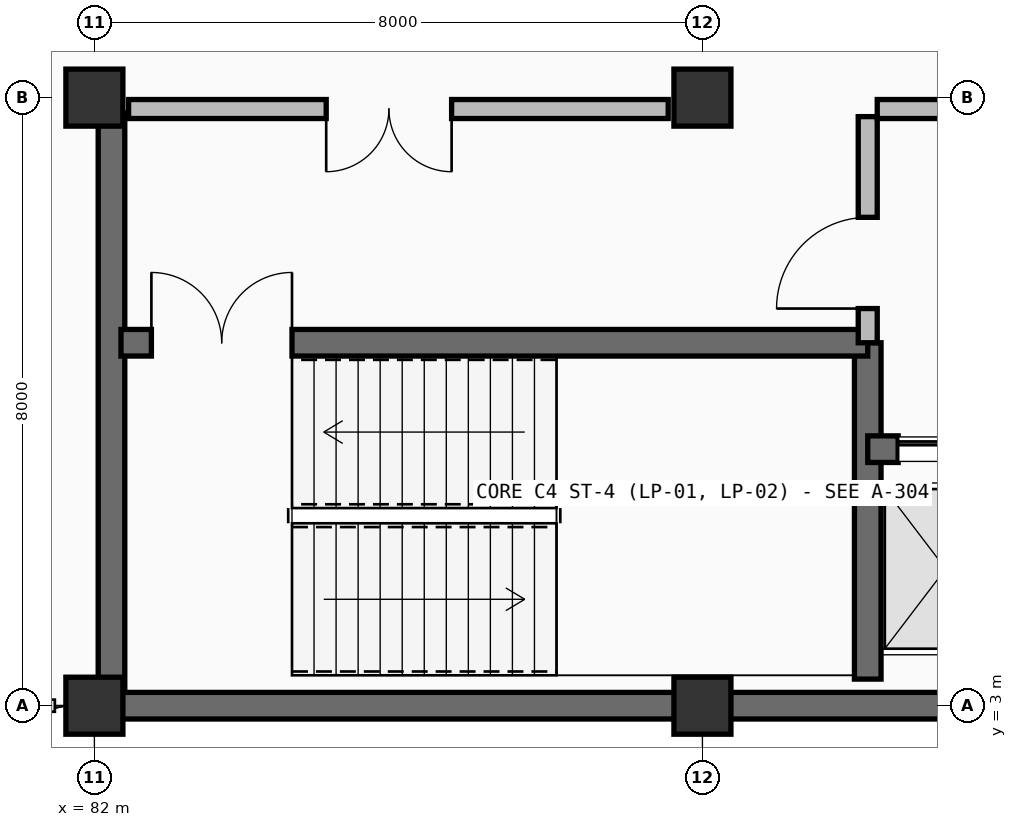
"""IFC4 building model, lengths in metres.
Left out: names, types, materials, properties, quantities, classifications, styles, units other than length and angle.
Written with IfcOpenShell. Run it as: python <this file> out.ifc"""

import sys

from ifc_helpers import new_model, si_unit, direction, frame, frame_2d, origin, origin_2d, place, context, subcontext, project, spatial, rectangle, extrude, element, fill, save


model = new_model("IFC4")
c1 = context("Model", 3, precision=1e-05, world=origin(), true_north=direction((0.0, 1.0)))
c2 = subcontext(c1, "Body", "Model", "MODEL_VIEW")
j1 = project(units=[si_unit("LENGTHUNIT", "METRE"), si_unit("PLANEANGLEUNIT", "RADIAN")], contexts=[c1])
p1 = place(None, origin())
s1 = spatial("IfcSite", under=j1, at=p1, CompositionType="ELEMENT")
p2 = place(p1, origin())
s2 = spatial("IfcBuilding", under=s1, at=p2, CompositionType="ELEMENT")
p3 = place(p2, frame((0.0, 0.0, 5.4)))
s3 = spatial("IfcBuildingStorey", under=s2, at=p3, CompositionType="ELEMENT", Elevation=5.4)
for number, where, z_axis, x_axis in (
    (1, (82.0, 3.0, 0.0), (0.0, 0.0, 1.0), (1.0, 0.0, 0.0)),
    (2, (82.0, 11.0, 0.0), (0.0, 0.0, 1.0), (1.0, 0.0, 0.0)),
    (3, (90.0, 3.0, 0.0), (0.0, 0.0, 1.0), (1.0, 0.0, 0.0)),
    (4, (90.0, 11.0, 0.0), (0.0, 0.0, 1.0), (1.0, 0.0, 0.0)),
):
    element("IfcColumn", number, at=place(p3, frame(where, z_axis=z_axis, x_axis=x_axis)), inside=s3, PredefinedType="COLUMN", context=c2, shape_type="SweptSolid", body=[
        extrude(rectangle(XDim=0.75, YDim=0.75, at=origin_2d()), origin(), (0.0, 0.0, 1.0), 4.5),
    ])
for number, where, z_axis, x_axis in (
    (5, (98.0, 3.0, 0.0), (0.0, 0.0, 1.0), (-1.0, 0.0, 0.0)),
    (6, (90.0, 3.0, 0.0), (0.0, 0.0, 1.0), (-1.0, 0.0, 0.0)),
):
    element("IfcWall", number, at=place(p3, frame(where, z_axis=z_axis, x_axis=x_axis)), inside=s3, PredefinedType="SHEAR", context=c2, shape_type="SweptSolid", body=[
        extrude(rectangle(XDim=8.0, YDim=0.35, at=frame_2d((4.0, 0.0))), origin(), (0.0, 0.0, 1.0), 4.5),
    ])
p4 = place(p3, frame((82.225, 3.2, 0.0), z_axis=(0.0, 0.0, 1.0), x_axis=(0.0, 1.0, 0.0)))
e7 = element("IfcWall", 7, at=p4, inside=s3, PredefinedType="SHEAR", context=c2, shape_type="SweptSolid", body=[
    extrude(rectangle(XDim=7.6, YDim=0.35, at=frame_2d((3.8, 0.0))), origin(), (0.0, 0.0, 1.0), 4.2),
])
p5 = place(p3, frame((92.175, 3.35, 0.0), z_axis=(0.0, 0.0, 1.0), x_axis=(0.0, 1.0, 0.0)))
e8 = element("IfcWall", 8, at=p5, inside=s3, PredefinedType="SHEAR", context=c2, shape_type="SweptSolid", body=[
    extrude(rectangle(XDim=4.425, YDim=0.35, at=frame_2d((2.212, 0.0))), origin(), (0.0, 0.0, 1.0), 4.2),
])
p6 = place(p3, frame((82.35, 7.775, 0.0), z_axis=(0.0, 0.0, 1.0), x_axis=(1.0, 0.0, 0.0)))
e9 = element("IfcWall", 9, at=p6, inside=s3, PredefinedType="SHEAR", context=c2, shape_type="SweptSolid", body=[
    extrude(rectangle(XDim=9.825, YDim=0.35, at=frame_2d((4.913, 0.0))), origin(), (0.0, 0.0, 1.0), 4.2),
])
p7 = place(p6, frame((0.4, 0.0, 0.0)))
e10 = element("IfcOpeningElement", 10, at=p7, cuts=e9, PredefinedType="OPENING", context=c2, shape_type="SweptSolid", body=[
    extrude(rectangle(XDim=1.85, YDim=2.25, at=frame_2d((0.925, 1.125))), frame((0.0, 0.185, 0.0), z_axis=(0.0, -1.0, 0.0), x_axis=(1.0, 0.0, 0.0)), (0.0, 0.0, 1.0), 0.37),
])
p8 = place(p3, frame((92.175, 6.375, 0.0), z_axis=(0.0, 0.0, 1.0), x_axis=(1.0, 0.0, 0.0)))
e11 = element("IfcWall", 11, at=p8, inside=s3, PredefinedType="SHEAR", context=c2, shape_type="SweptSolid", body=[
    extrude(rectangle(XDim=5.475, YDim=0.35, at=frame_2d((2.737, 0.0))), origin(), (0.0, 0.0, 1.0), 4.2),
])
p9 = place(p8, frame((0.4, 0.0, 0.0)))
e12 = element("IfcOpeningElement", 12, at=p9, cuts=e11, PredefinedType="OPENING", context=c2, shape_type="SweptSolid", body=[
    extrude(rectangle(XDim=1.25, YDim=2.25, at=frame_2d((0.625, 1.125))), frame((0.0, 0.185, 0.0), z_axis=(0.0, -1.0, 0.0), x_axis=(1.0, 0.0, 0.0)), (0.0, 0.0, 1.0), 0.37),
])
p10 = place(p8, frame((3.275, 0.0, 0.0)))
e13 = element("IfcOpeningElement", 13, at=p10, cuts=e11, PredefinedType="OPENING", context=c2, shape_type="SweptSolid", body=[
    extrude(rectangle(XDim=1.1, YDim=2.2, at=frame_2d((0.55, 1.1))), frame((0.0, 0.185, 0.0), z_axis=(0.0, -1.0, 0.0), x_axis=(1.0, 0.0, 0.0)), (0.0, 0.0, 1.0), 0.37),
])
p11 = place(p3, frame((92.175, 7.775, 0.0), z_axis=(0.0, 0.0, 1.0), x_axis=(0.0, 1.0, 0.0)))
e14 = element("IfcWall", 14, at=p11, inside=s3, PredefinedType="PARTITIONING", context=c2, shape_type="SweptSolid", body=[
    extrude(rectangle(XDim=2.975, YDim=0.25, at=frame_2d((1.488, 0.0))), origin(), (0.0, 0.0, 1.0), 4.2),
])
p12 = place(p11, frame((0.45, 0.0, 0.0)))
e15 = element("IfcOpeningElement", 15, at=p12, cuts=e14, PredefinedType="OPENING", context=c2, shape_type="SweptSolid", body=[
    extrude(rectangle(XDim=1.2, YDim=2.2, at=frame_2d((0.6, 1.1))), frame((0.0, 0.135, 0.0), z_axis=(0.0, -1.0, 0.0), x_axis=(1.0, 0.0, 0.0)), (0.0, 0.0, 1.0), 0.27),
])
p13 = place(p3, frame((82.45, 10.85, 0.0), z_axis=(0.0, 0.0, 1.0), x_axis=(1.0, 0.0, 0.0)))
e16 = element("IfcWall", 16, at=p13, inside=s3, PredefinedType="PARTITIONING", context=c2, shape_type="SweptSolid", body=[
    extrude(rectangle(XDim=7.1, YDim=0.25, at=frame_2d((3.55, 0.0))), origin(), (0.0, 0.0, 1.0), 3.435),
])
p14 = place(p13, frame((2.6, 0.0, 0.0)))
e17 = element("IfcOpeningElement", 17, at=p14, cuts=e16, PredefinedType="OPENING", context=c2, shape_type="SweptSolid", body=[
    extrude(rectangle(XDim=1.65, YDim=2.25, at=frame_2d((0.825, 1.125))), frame((0.0, 0.135, 0.0), z_axis=(0.0, -1.0, 0.0), x_axis=(1.0, 0.0, 0.0)), (0.0, 0.0, 1.0), 0.27),
])
p15 = place(p3, frame((92.3, 10.85, 0.0), z_axis=(0.0, 0.0, 1.0), x_axis=(1.0, 0.0, 0.0)))
e18 = element("IfcWall", 18, at=p15, inside=s3, PredefinedType="PARTITIONING", context=c2, shape_type="SweptSolid", body=[
    extrude(rectangle(XDim=5.25, YDim=0.25, at=frame_2d((2.625, 0.0))), origin(), (0.0, 0.0, 1.0), 3.435),
])
p16 = place(p15, frame((1.85, 0.0, 0.0)))
e19 = element("IfcOpeningElement", 19, at=p16, cuts=e18, PredefinedType="OPENING", context=c2, shape_type="SweptSolid", body=[
    extrude(rectangle(XDim=1.5, YDim=2.2, at=frame_2d((0.75, 1.1))), frame((0.0, 0.135, 0.0), z_axis=(0.0, -1.0, 0.0), x_axis=(1.0, 0.0, 0.0)), (0.0, 0.0, 1.0), 0.27),
])
p17 = place(p7, origin())
e20 = element("IfcDoor", 20, at=p17, inside=s3, OperationType="DOUBLE_DOOR_SINGLE_SWING", PredefinedType="DOOR", context=c2, shape_type="SweptSolid", body=[
    extrude(rectangle(XDim=1.85, YDim=2.25, at=frame_2d((0.925, 1.125))), frame((0.0, 0.025, 0.0), z_axis=(0.0, -1.0, 0.0), x_axis=(1.0, 0.0, 0.0)), (0.0, 0.0, 1.0), 0.05),
])
fill(e10, e20)
p18 = place(p9, origin())
e21 = element("IfcDoor", 21, at=p18, inside=s3, OperationType="DOUBLE_DOOR_SLIDING", PredefinedType="DOOR", context=c2, shape_type="SweptSolid", body=[
    extrude(rectangle(XDim=1.25, YDim=2.25, at=frame_2d((0.625, 1.125))), frame((0.0, 0.025, 0.0), z_axis=(0.0, -1.0, 0.0), x_axis=(1.0, 0.0, 0.0)), (0.0, 0.0, 1.0), 0.05),
])
fill(e12, e21)
p19 = place(p12, origin())
e22 = element("IfcDoor", 22, at=p19, inside=s3, OperationType="SINGLE_SWING_LEFT", PredefinedType="DOOR", context=c2, shape_type="SweptSolid", body=[
    extrude(rectangle(XDim=1.2, YDim=2.2, at=frame_2d((0.6, 1.1))), frame((0.0, 0.025, 0.0), z_axis=(0.0, -1.0, 0.0), x_axis=(1.0, 0.0, 0.0)), (0.0, 0.0, 1.0), 0.05),
])
fill(e15, e22)
p20 = place(p14, frame((1.65, 0.0, 0.0), z_axis=(0.0, 0.0, 1.0), x_axis=(-1.0, 0.0, 0.0)))
e23 = element("IfcDoor", 23, at=p20, inside=s3, OperationType="DOUBLE_DOOR_SINGLE_SWING", PredefinedType="DOOR", context=c2, shape_type="SweptSolid", body=[
    extrude(rectangle(XDim=1.65, YDim=2.25, at=frame_2d((0.825, 1.125))), frame((0.0, 0.025, 0.0), z_axis=(0.0, -1.0, 0.0), x_axis=(1.0, 0.0, 0.0)), (0.0, 0.0, 1.0), 0.05),
])
fill(e17, e23)
save(model, sys.argv[1])
